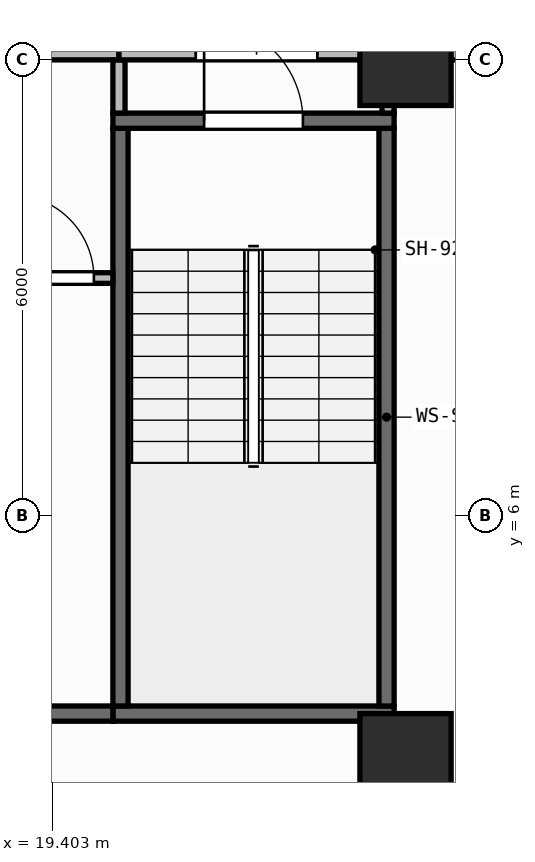
"""IFC4 building model, lengths in metres.
Left out: names, types, materials, properties, quantities, classifications, styles, units other than length and angle.
Written with IfcOpenShell. Run it as: python <this file> out.ifc"""

import sys

from ifc_helpers import new_model, si_unit, direction, frame, frame_2d, origin, origin_2d, place, context, subcontext, project, spatial, rectangle, extrude, element, fill, save


model = new_model("IFC4")
c1 = context("Model", 3, precision=1e-05, world=origin(), true_north=direction((0.0, 1.0)))
c2 = subcontext(c1, "Body", "Model", "MODEL_VIEW")
j1 = project(units=[si_unit("LENGTHUNIT", "METRE"), si_unit("PLANEANGLEUNIT", "RADIAN")], contexts=[c1])
p1 = place(None, origin())
s1 = spatial("IfcSite", under=j1, at=p1, CompositionType="ELEMENT")
p2 = place(p1, origin())
s2 = spatial("IfcBuilding", under=s1, at=p2, CompositionType="ELEMENT")
p3 = place(p2, frame((0.0, 0.0, 162.6)))
s3 = spatial("IfcBuildingStorey", under=s2, at=p3, CompositionType="ELEMENT", Elevation=162.6)
for number, where, z_axis, x_axis in (
    (1, (24.05, 2.8, 0.0), (0.0, 0.0, 1.0), (1.0, 0.0, 0.0)),
    (2, (24.05, 12.0, 0.0), (0.0, 0.0, 1.0), (1.0, 0.0, 0.0)),
):
    element("IfcColumn", number, at=place(p3, frame(where, z_axis=z_axis, x_axis=x_axis)), inside=s3, PredefinedType="COLUMN", context=c2, shape_type="SweptSolid", body=[
        extrude(rectangle(XDim=1.2, YDim=1.2, at=origin_2d()), origin(), (0.0, 0.0, 1.0), 3.95),
    ])
p4 = place(p3, frame((2.76, 0.173, 0.0), z_axis=(0.0, 0.0, 1.0), x_axis=(0.996857931723, 0.079210251617, 0.0)))
e3 = element("IfcWall", 3, at=p4, inside=s3, PredefinedType="STANDARD", context=c2, shape_type="SweptSolid", body=[
    extrude(rectangle(XDim=51.442, YDim=0.26, at=frame_2d((25.721, 0.0))), origin(), (0.0, 0.0, 1.0), 3.71),
])
p5 = place(p4, frame((24.521, 0.0, 0.9)))
e4 = element("IfcOpeningElement", 4, at=p5, cuts=e3, PredefinedType="OPENING", context=c2, shape_type="SweptSolid", body=[
    extrude(rectangle(XDim=2.4, YDim=1.65, at=frame_2d((1.2, 0.825))), frame((0.0, 0.14, 0.0), z_axis=(0.0, -1.0, 0.0), x_axis=(1.0, 0.0, 0.0)), (0.0, 0.0, 1.0), 0.28),
])
p6 = place(p3, frame((20.2, 3.4, 0.0), z_axis=(0.0, 0.0, 1.0), x_axis=(1.0, 0.0, 0.0)))
e5 = element("IfcWall", 5, at=p6, inside=s3, PredefinedType="SHEAR", context=c2, shape_type="SweptSolid", body=[
    extrude(rectangle(XDim=3.7, YDim=0.2, at=frame_2d((1.85, 0.0))), origin(), (0.0, 0.0, 1.0), 3.71),
])
for number, where, z_axis, x_axis in (
    (6, (20.3, 3.5, 0.0), (0.0, 0.0, 1.0), (0.0, 1.0, 0.0)),
    (7, (23.8, 3.5, 0.0), (0.0, 0.0, 1.0), (0.0, 1.0, 0.0)),
):
    element("IfcWall", number, at=place(p3, frame(where, z_axis=z_axis, x_axis=x_axis)), inside=s3, PredefinedType="SHEAR", context=c2, shape_type="SweptSolid", body=[
        extrude(rectangle(XDim=7.6, YDim=0.2, at=frame_2d((3.8, 0.0))), origin(), (0.0, 0.0, 1.0), 3.71),
    ])
p7 = place(p3, frame((20.2, 11.2, 0.0), z_axis=(0.0, 0.0, 1.0), x_axis=(1.0, 0.0, 0.0)))
e8 = element("IfcWall", 8, at=p7, inside=s3, PredefinedType="SHEAR", context=c2, shape_type="SweptSolid", body=[
    extrude(rectangle(XDim=3.7, YDim=0.2, at=frame_2d((1.85, 0.0))), origin(), (0.0, 0.0, 1.0), 3.71),
])
p8 = place(p7, frame((1.2, 0.0, 0.0)))
e9 = element("IfcOpeningElement", 9, at=p8, cuts=e8, PredefinedType="OPENING", context=c2, shape_type="SweptSolid", body=[
    extrude(rectangle(XDim=1.3, YDim=2.15, at=frame_2d((0.65, 1.075))), frame((0.0, 0.11, 0.0), z_axis=(0.0, -1.0, 0.0), x_axis=(1.0, 0.0, 0.0)), (0.0, 0.0, 1.0), 0.22),
])
p9 = place(p3, frame((6.5, 3.4, 0.0), z_axis=(0.0, 0.0, 1.0), x_axis=(1.0, 0.0, 0.0)))
e10 = element("IfcWall", 10, at=p9, inside=s3, PredefinedType="SHEAR", context=c2, shape_type="SweptSolid", body=[
    extrude(rectangle(XDim=13.7, YDim=0.2, at=frame_2d((6.85, 0.0))), origin(), (0.0, 0.0, 1.0), 3.71),
])
p10 = place(p3, frame((18.61, 9.13, 0.0), z_axis=(0.0, 0.0, 1.0), x_axis=(1.0, 0.0, 0.0)))
e11 = element("IfcWall", 11, at=p10, inside=s3, PredefinedType="PARTITIONING", context=c2, shape_type="SweptSolid", body=[
    extrude(rectangle(XDim=1.59, YDim=0.14, at=frame_2d((0.795, 0.0))), origin(), (0.0, 0.0, 1.0), 3.71),
])
p11 = place(p10, frame((0.24, 0.0, 0.0)))
e12 = element("IfcOpeningElement", 12, at=p11, cuts=e11, PredefinedType="OPENING", context=c2, shape_type="SweptSolid", body=[
    extrude(rectangle(XDim=1.1, YDim=2.1, at=frame_2d((0.55, 1.05))), frame((0.0, 0.08, 0.0), z_axis=(0.0, -1.0, 0.0), x_axis=(1.0, 0.0, 0.0)), (0.0, 0.0, 1.0), 0.16),
])
p12 = place(p3, frame((12.58, 12.08, 0.0), z_axis=(0.0, 0.0, 1.0), x_axis=(1.0, 0.0, 0.0)))
e13 = element("IfcWall", 13, at=p12, inside=s3, PredefinedType="PARTITIONING", context=c2, shape_type="SweptSolid", body=[
    extrude(rectangle(XDim=7.7, YDim=0.16, at=frame_2d((3.85, 0.0))), origin(), (0.0, 0.0, 1.0), 3.083),
])
p13 = place(p12, frame((3.05, 0.0, 0.0)))
e14 = element("IfcOpeningElement", 14, at=p13, cuts=e13, PredefinedType="OPENING", context=c2, shape_type="SweptSolid", body=[
    extrude(rectangle(XDim=1.6, YDim=2.05, at=frame_2d((0.8, 1.025))), frame((0.0, 0.09, 0.0), z_axis=(0.0, -1.0, 0.0), x_axis=(1.0, 0.0, 0.0)), (0.0, 0.0, 1.0), 0.18),
])
p14 = place(p3, frame((20.28, 11.3, 0.0), z_axis=(0.0, 0.0, 1.0), x_axis=(0.0, 1.0, 0.0)))
e15 = element("IfcWall", 15, at=p14, inside=s3, PredefinedType="PARTITIONING", context=c2, shape_type="SweptSolid", body=[
    extrude(rectangle(XDim=0.7, YDim=0.16, at=frame_2d((0.35, 0.0))), origin(), (0.0, 0.0, 1.0), 3.71),
])
p15 = place(p3, frame((20.28, 12.08, 0.0), z_axis=(0.0, 0.0, 1.0), x_axis=(1.0, 0.0, 0.0)))
e16 = element("IfcWall", 16, at=p15, inside=s3, PredefinedType="PARTITIONING", context=c2, shape_type="SweptSolid", body=[
    extrude(rectangle(XDim=3.62, YDim=0.16, at=frame_2d((1.81, 0.0))), origin(), (0.0, 0.0, 1.0), 3.083),
])
p16 = place(p15, frame((1.01, 0.0, 0.0)))
e17 = element("IfcOpeningElement", 17, at=p16, cuts=e16, PredefinedType="OPENING", context=c2, shape_type="SweptSolid", body=[
    extrude(rectangle(XDim=1.6, YDim=2.05, at=frame_2d((0.8, 1.025))), frame((0.0, 0.09, 0.0), z_axis=(0.0, -1.0, 0.0), x_axis=(1.0, 0.0, 0.0)), (0.0, 0.0, 1.0), 0.18),
])
p17 = place(p3, frame((23.82, 11.3, 0.0), z_axis=(0.0, 0.0, 1.0), x_axis=(0.0, 1.0, 0.0)))
e18 = element("IfcWall", 18, at=p17, inside=s3, PredefinedType="PARTITIONING", context=c2, shape_type="SweptSolid", body=[
    extrude(rectangle(XDim=0.7, YDim=0.16, at=frame_2d((0.35, 0.0))), origin(), (0.0, 0.0, 1.0), 3.71),
])
p18 = place(p3, frame((24.02, 12.08, 0.0), z_axis=(0.0, 0.0, 1.0), x_axis=(1.0, 0.0, 0.0)))
e19 = element("IfcWall", 19, at=p18, inside=s3, PredefinedType="PARTITIONING", context=c2, shape_type="SweptSolid", body=[
    extrude(rectangle(XDim=1.244, YDim=0.16, at=frame_2d((0.622, 0.0))), origin(), (0.0, 0.0, 1.0), 3.083),
])
p19 = place(p8, origin())
e20 = element("IfcDoor", 20, at=p19, inside=s3, OperationType="SINGLE_SWING_LEFT", PredefinedType="DOOR", context=c2, shape_type="SweptSolid", body=[
    extrude(rectangle(XDim=1.3, YDim=2.15, at=frame_2d((0.65, 1.075))), frame((0.0, 0.025, 0.0), z_axis=(0.0, -1.0, 0.0), x_axis=(1.0, 0.0, 0.0)), (0.0, 0.0, 1.0), 0.05),
])
fill(e9, e20)
p20 = place(p11, origin())
e21 = element("IfcDoor", 21, at=p20, inside=s3, OperationType="SINGLE_SWING_LEFT", PredefinedType="DOOR", context=c2, shape_type="SweptSolid", body=[
    extrude(rectangle(XDim=1.1, YDim=2.1, at=frame_2d((0.55, 1.05))), frame((0.0, 0.025, 0.0), z_axis=(0.0, -1.0, 0.0), x_axis=(1.0, 0.0, 0.0)), (0.0, 0.0, 1.0), 0.05),
])
fill(e12, e21)
p21 = place(p16, origin())
e22 = element("IfcDoor", 22, at=p21, inside=s3, OperationType="DOUBLE_DOOR_SINGLE_SWING", PredefinedType="DOOR", context=c2, shape_type="SweptSolid", body=[
    extrude(rectangle(XDim=1.6, YDim=2.05, at=frame_2d((0.8, 1.025))), frame((0.0, 0.025, 0.0), z_axis=(0.0, -1.0, 0.0), x_axis=(1.0, 0.0, 0.0)), (0.0, 0.0, 1.0), 0.05),
])
fill(e17, e22)
save(model, sys.argv[1])
